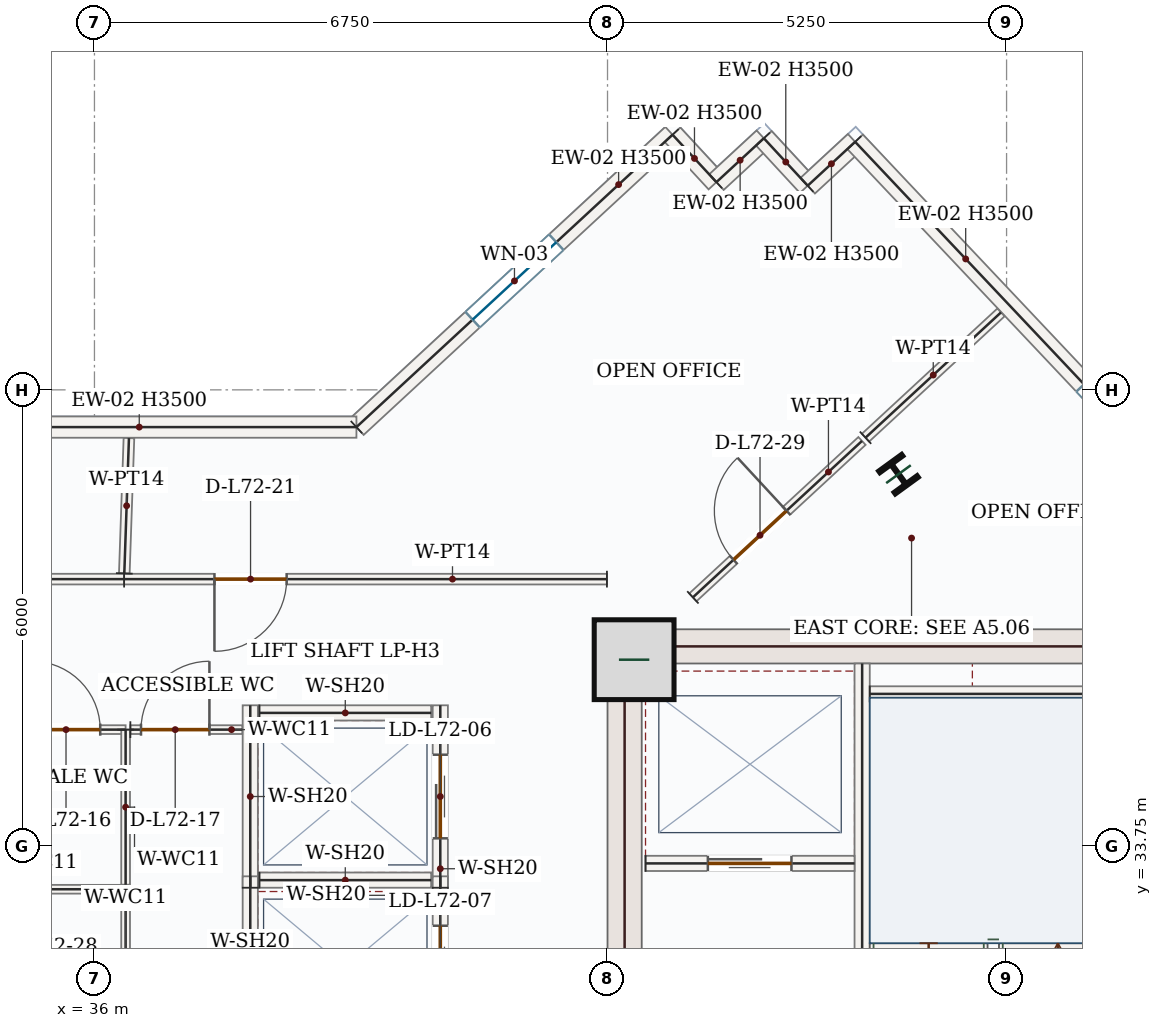
"""IFC4 building model, lengths in metres.
Left out: names, types, materials, properties, quantities, classifications, styles, units other than length and angle.
Written with IfcOpenShell. Run it as: python <this file> out.ifc"""

import sys

from ifc_helpers import new_model, si_unit, direction, frame, frame_2d, origin, origin_2d, place, context, subcontext, project, spatial, rectangle, i_section, extrude, source, transform, mapped, element, fill, save


model = new_model("IFC4")
c1 = context("Model", 3, precision=1e-05, world=origin(), true_north=direction((0.0, 1.0)))
c2 = subcontext(c1, "Body", "Model", "MODEL_VIEW")
j1 = project(units=[si_unit("LENGTHUNIT", "METRE"), si_unit("PLANEANGLEUNIT", "RADIAN")], contexts=[c1])
p1 = place(None, origin())
s1 = spatial("IfcSite", under=j1, at=p1, CompositionType="ELEMENT")
p2 = place(p1, origin())
s2 = spatial("IfcBuilding", under=s1, at=p2, CompositionType="ELEMENT")
p3 = place(p2, frame((0.0, 0.0, 299.1)))
s3 = spatial("IfcBuildingStorey", under=s2, at=p3, CompositionType="ELEMENT", Elevation=299.1)
p4 = place(p3, frame((42.975, 28.05, 0.0), z_axis=(0.0, 0.0, 1.0), x_axis=(0.0, 1.0, 0.0)))
e1 = element("IfcWall", 1, at=p4, inside=s3, PredefinedType="SHEAR", context=c2, shape_type="SweptSolid", body=[
    extrude(rectangle(XDim=8.55, YDim=0.45, at=frame_2d((4.275, 0.0))), origin(), (0.0, 0.0, 1.0), 3.5),
])
p5 = place(p4, frame((1.5, 0.0, 0.0)))
e2 = element("IfcOpeningElement", 2, at=p5, cuts=e1, PredefinedType="OPENING", context=c2, shape_type="SweptSolid", body=[
    extrude(rectangle(XDim=1.1, YDim=2.2, at=frame_2d((0.55, 1.1))), frame((0.0, 0.235, 0.0), z_axis=(0.0, -1.0, 0.0), x_axis=(1.0, 0.0, 0.0)), (0.0, 0.0, 1.0), 0.47),
])
m1 = source(origin(), c2, "Body", "SweptSolid", [
    extrude(rectangle(XDim=7.1, YDim=0.45, at=frame_2d((3.55, 0.0))), origin(), (0.0, 0.0, 1.0), 3.5),
])
p6 = place(p3, frame((43.2, 36.375, 0.0), z_axis=(0.0, 0.0, 1.0), x_axis=(1.0, 0.0, 0.0)))
e3 = element("IfcWall", 3, at=p6, inside=s3, PredefinedType="SHEAR", context=c2, shape_type="MappedRepresentation", body=[
    mapped(m1, transform((0.0, 0.0, 0.0), x_axis=(1.0, 0.0, 0.0), y_axis=(0.0, 1.0, 0.0), z_axis=(0.0, 0.0, 1.0), scale=1.0)),
])
m2 = source(origin(), c2, "Body", "SweptSolid", [
    extrude(rectangle(XDim=1.05, YDim=1.05, at=origin_2d()), origin(), (0.0, 0.0, 1.0), 3.75),
])
p7 = place(p3, frame((43.1, 36.2, 0.0), z_axis=(0.0, 0.0, 1.0), x_axis=(1.0, 0.0, 0.0)))
e4 = element("IfcColumn", 4, at=p7, inside=s3, PredefinedType="COLUMN", context=c2, shape_type="MappedRepresentation", body=[
    mapped(m2, transform((0.0, 0.0, 0.0), x_axis=(1.0, 0.0, 0.0), y_axis=(0.0, 1.0, 0.0), z_axis=(0.0, 0.0, 1.0), scale=1.0)),
])
m3 = source(origin(), c2, "Body", "SweptSolid", [
    extrude(i_section(OverallWidth=0.374, OverallDepth=0.372, WebThickness=0.016, FlangeThickness=0.026, FilletRadius=0.018, at=origin_2d()), origin(), (0.0, 0.0, 1.0), 3.75),
])
p8 = place(p3, frame((46.578, 38.641, 0.0), z_axis=(0.0, 0.0, 1.0), x_axis=(0.809016994375, 0.587785252292, 0.0)))
e5 = element("IfcColumn", 5, at=p8, inside=s3, PredefinedType="COLUMN", context=c2, shape_type="MappedRepresentation", body=[
    mapped(m3, transform((0.0, 0.0, 0.0), x_axis=(1.0, 0.0, 0.0), y_axis=(0.0, 1.0, 0.0), z_axis=(0.0, 0.0, 1.0), scale=1.0)),
])
p9 = place(p3, frame((39.447, 39.26, 0.0), z_axis=(0.0, 0.0, 1.0), x_axis=(0.734109106874, 0.679031530346, 0.0)))
e6 = element("IfcWall", 6, at=p9, inside=s3, PredefinedType="SOLIDWALL", context=c2, shape_type="SweptSolid", body=[
    extrude(rectangle(XDim=5.665, YDim=0.28, at=frame_2d((2.833, 0.0))), origin(), (0.0, 0.0, 1.0), 3.5),
])
p10 = place(p9, frame((2.082, 0.0, 0.85)))
e7 = element("IfcOpeningElement", 7, at=p10, cuts=e6, PredefinedType="OPENING", context=c2, shape_type="SweptSolid", body=[
    extrude(rectangle(XDim=1.5, YDim=1.5, at=frame_2d((0.75, 0.75))), frame((0.0, 0.15, 0.0), z_axis=(0.0, -1.0, 0.0), x_axis=(1.0, 0.0, 0.0)), (0.0, 0.0, 1.0), 0.3),
])
m4 = source(origin(), c2, "Body", "SweptSolid", [
    extrude(rectangle(XDim=0.85, YDim=0.28, at=frame_2d((0.425, 0.0))), origin(), (0.0, 0.0, 1.0), 3.5),
])
for number, where, z_axis, x_axis in (
    (8, (43.605, 43.107, 0.0), (0.0, 0.0, 1.0), (0.679, -0.734, 0.0)),
    (9, (44.183, 42.483, 0.0), (0.0, 0.0, 1.0), (0.734, 0.679, 0.0)),
    (10, (44.807, 43.06, 0.0), (0.0, 0.0, 1.0), (0.679, -0.734, 0.0)),
    (11, (45.384, 42.436, 0.0), (0.0, 0.0, 1.0), (0.734, 0.679, 0.0)),
):
    element("IfcWall", number, at=place(p3, frame(where, z_axis=z_axis, x_axis=x_axis)), inside=s3, PredefinedType="SOLIDWALL", context=c2, shape_type="MappedRepresentation", body=[
        mapped(m4, transform((0.0, 0.0, 0.0), x_axis=(1.0, 0.0, 0.0), y_axis=(0.0, 1.0, 0.0), z_axis=(0.0, 0.0, 1.0), scale=1.0)),
    ])
p11 = place(p3, frame((46.008, 43.013, 0.0), z_axis=(0.0, 0.0, 1.0), x_axis=(0.68643580465, -0.727190405667, 0.0)))
e12 = element("IfcWall", 12, at=p11, inside=s3, PredefinedType="SOLIDWALL", context=c2, shape_type="SweptSolid", body=[
    extrude(rectangle(XDim=10.274, YDim=0.28, at=frame_2d((5.137, 0.0))), origin(), (0.0, 0.0, 1.0), 3.5),
])
p12 = place(p11, frame((4.387, 0.0, 0.85)))
e13 = element("IfcOpeningElement", 13, at=p12, cuts=e12, PredefinedType="OPENING", context=c2, shape_type="SweptSolid", body=[
    extrude(rectangle(XDim=1.5, YDim=1.5, at=frame_2d((0.75, 0.75))), frame((0.0, 0.15, 0.0), z_axis=(0.0, -1.0, 0.0), x_axis=(1.0, 0.0, 0.0)), (0.0, 0.0, 1.0), 0.3),
])
m5 = source(origin(), c2, "Body", "SweptSolid", [
    extrude(rectangle(XDim=5.714, YDim=0.28, at=frame_2d((2.857, 0.0))), origin(), (0.0, 0.0, 1.0), 3.5),
])
p13 = place(p3, frame((33.732, 39.26, 0.0), z_axis=(0.0, 0.0, 1.0), x_axis=(1.0, 0.0, 0.0)))
e14 = element("IfcWall", 14, at=p13, inside=s3, PredefinedType="SOLIDWALL", context=c2, shape_type="MappedRepresentation", body=[
    mapped(m5, transform((0.0, 0.0, 0.0), x_axis=(1.0, 0.0, 0.0), y_axis=(0.0, 1.0, 0.0), z_axis=(0.0, 0.0, 1.0), scale=1.0)),
])
p14 = place(p3, frame((46.1, 28.15, 0.0), z_axis=(0.0, 0.0, 1.0), x_axis=(0.0, 1.0, 0.0)))
e15 = element("IfcWall", 15, at=p14, inside=s3, PredefinedType="SOLIDWALL", context=c2, shape_type="SweptSolid", body=[
    extrude(rectangle(XDim=8.0, YDim=0.2, at=frame_2d((4.0, 0.0))), origin(), (0.0, 0.0, 1.0), 3.5),
])
p15 = place(p14, frame((0.4, 0.0, 0.0)))
e16 = element("IfcOpeningElement", 16, at=p15, cuts=e15, PredefinedType="OPENING", context=c2, shape_type="SweptSolid", body=[
    extrude(rectangle(XDim=1.05, YDim=2.15, at=frame_2d((0.525, 1.075))), frame((0.0, 0.11, 0.0), z_axis=(0.0, -1.0, 0.0), x_axis=(1.0, 0.0, 0.0)), (0.0, 0.0, 1.0), 0.22),
])
m6 = source(origin(), c2, "Body", "SweptSolid", [
    extrude(rectangle(XDim=3.25, YDim=0.2, at=frame_2d((1.625, 0.0))), origin(), (0.0, 0.0, 1.0), 3.5),
])
p16 = place(p3, frame((46.2, 35.75, 0.0), z_axis=(0.0, 0.0, 1.0), x_axis=(1.0, 0.0, 0.0)))
e17 = element("IfcWall", 17, at=p16, inside=s3, PredefinedType="SOLIDWALL", context=c2, shape_type="MappedRepresentation", body=[
    mapped(m6, transform((0.0, 0.0, 0.0), x_axis=(1.0, 0.0, 0.0), y_axis=(0.0, 1.0, 0.0), z_axis=(0.0, 0.0, 1.0), scale=1.0)),
])
p17 = place(p3, frame((43.25, 33.52, 0.0), z_axis=(0.0, 0.0, 1.0), x_axis=(1.0, 0.0, 0.0)))
e18 = element("IfcWall", 18, at=p17, inside=s3, PredefinedType="SOLIDWALL", context=c2, shape_type="SweptSolid", body=[
    extrude(rectangle(XDim=2.75, YDim=0.2, at=frame_2d((1.375, 0.0))), origin(), (0.0, 0.0, 1.0), 3.5),
])
p18 = place(p17, frame((0.82, 0.0, 0.0)))
e19 = element("IfcOpeningElement", 19, at=p18, cuts=e18, PredefinedType="OPENING", context=c2, shape_type="SweptSolid", body=[
    extrude(rectangle(XDim=1.1, YDim=2.15, at=frame_2d((0.55, 1.075))), frame((0.0, 0.11, 0.0), z_axis=(0.0, -1.0, 0.0), x_axis=(1.0, 0.0, 0.0)), (0.0, 0.0, 1.0), 0.22),
])
m7 = source(origin(), c2, "Body", "SweptSolid", [
    extrude(rectangle(XDim=2.4, YDim=0.2, at=frame_2d((1.2, 0.0))), origin(), (0.0, 0.0, 1.0), 3.5),
])
p19 = place(p3, frame((38.05, 33.2, 0.0), z_axis=(0.0, 0.0, 1.0), x_axis=(0.0, 1.0, 0.0)))
e20 = element("IfcWall", 20, at=p19, inside=s3, PredefinedType="SOLIDWALL", context=c2, shape_type="MappedRepresentation", body=[
    mapped(m7, transform((0.0, 0.0, 0.0), x_axis=(1.0, 0.0, 0.0), y_axis=(0.0, 1.0, 0.0), z_axis=(0.0, 0.0, 1.0), scale=1.0)),
])
p20 = place(p3, frame((40.55, 33.2, 0.0), z_axis=(0.0, 0.0, 1.0), x_axis=(0.0, 1.0, 0.0)))
e21 = element("IfcWall", 21, at=p20, inside=s3, PredefinedType="SOLIDWALL", context=c2, shape_type="SweptSolid", body=[
    extrude(rectangle(XDim=2.4, YDim=0.2, at=frame_2d((1.2, 0.0))), origin(), (0.0, 0.0, 1.0), 3.5),
])
p21 = place(p20, frame((0.65, 0.0, 0.0)))
e22 = element("IfcOpeningElement", 22, at=p21, cuts=e21, PredefinedType="OPENING", context=c2, shape_type="SweptSolid", body=[
    extrude(rectangle(XDim=1.1, YDim=2.15, at=frame_2d((0.55, 1.075))), frame((0.0, 0.11, 0.0), z_axis=(0.0, -1.0, 0.0), x_axis=(1.0, 0.0, 0.0)), (0.0, 0.0, 1.0), 0.22),
])
m8 = source(origin(), c2, "Body", "SweptSolid", [
    extrude(rectangle(XDim=2.26, YDim=0.2, at=frame_2d((1.13, 0.0))), origin(), (0.0, 0.0, 1.0), 3.5),
])
for number, where, z_axis, x_axis in (
    (23, (38.17, 33.3, 0.0), (0.0, 0.0, 1.0), (1.0, 0.0, 0.0)),
    (24, (38.17, 35.5, 0.0), (0.0, 0.0, 1.0), (1.0, 0.0, 0.0)),
):
    element("IfcWall", number, at=place(p3, frame(where, z_axis=z_axis, x_axis=x_axis)), inside=s3, PredefinedType="SOLIDWALL", context=c2, shape_type="MappedRepresentation", body=[
        mapped(m8, transform((0.0, 0.0, 0.0), x_axis=(1.0, 0.0, 0.0), y_axis=(0.0, 1.0, 0.0), z_axis=(0.0, 0.0, 1.0), scale=1.0)),
    ])
p22 = place(p3, frame((38.05, 30.95, 0.0), z_axis=(0.0, 0.0, 1.0), x_axis=(0.0, 1.0, 0.0)))
e25 = element("IfcWall", 25, at=p22, inside=s3, PredefinedType="SOLIDWALL", context=c2, shape_type="MappedRepresentation", body=[
    mapped(m7, transform((0.0, 0.0, 0.0), x_axis=(1.0, 0.0, 0.0), y_axis=(0.0, 1.0, 0.0), z_axis=(0.0, 0.0, 1.0), scale=1.0)),
])
p23 = place(p3, frame((40.55, 30.95, 0.0), z_axis=(0.0, 0.0, 1.0), x_axis=(0.0, 1.0, 0.0)))
e26 = element("IfcWall", 26, at=p23, inside=s3, PredefinedType="SOLIDWALL", context=c2, shape_type="SweptSolid", body=[
    extrude(rectangle(XDim=2.4, YDim=0.2, at=frame_2d((1.2, 0.0))), origin(), (0.0, 0.0, 1.0), 3.5),
])
p24 = place(p23, frame((0.65, 0.0, 0.0)))
e27 = element("IfcOpeningElement", 27, at=p24, cuts=e26, PredefinedType="OPENING", context=c2, shape_type="SweptSolid", body=[
    extrude(rectangle(XDim=1.1, YDim=2.15, at=frame_2d((0.55, 1.075))), frame((0.0, 0.11, 0.0), z_axis=(0.0, -1.0, 0.0), x_axis=(1.0, 0.0, 0.0)), (0.0, 0.0, 1.0), 0.22),
])
m9 = source(origin(), c2, "Body", "SweptSolid", [
    extrude(rectangle(XDim=2.355, YDim=0.115, at=frame_2d((1.177, 0.0))), origin(), (0.0, 0.0, 1.0), 3.5),
])
p25 = place(p3, frame((34.055, 33.18, 0.0), z_axis=(0.0, 0.0, 1.0), x_axis=(1.0, 0.0, 0.0)))
e28 = element("IfcWall", 28, at=p25, inside=s3, PredefinedType="PARTITIONING", context=c2, shape_type="MappedRepresentation", body=[
    mapped(m9, transform((0.0, 0.0, 0.0), x_axis=(1.0, 0.0, 0.0), y_axis=(0.0, 1.0, 0.0), z_axis=(0.0, 0.0, 1.0), scale=1.0)),
])
m10 = source(origin(), c2, "Body", "SweptSolid", [
    extrude(rectangle(XDim=1.96, YDim=0.115, at=frame_2d((0.98, 0.0))), origin(), (0.0, 0.0, 1.0), 3.5),
])
p26 = place(p3, frame((36.41, 33.18, 0.0), z_axis=(0.0, 0.0, 1.0), x_axis=(0.0, -1.0, 0.0)))
e29 = element("IfcWall", 29, at=p26, inside=s3, PredefinedType="PARTITIONING", context=c2, shape_type="MappedRepresentation", body=[
    mapped(m10, transform((0.0, 0.0, 0.0), x_axis=(1.0, 0.0, 0.0), y_axis=(0.0, 1.0, 0.0), z_axis=(0.0, 0.0, 1.0), scale=1.0)),
])
p27 = place(p3, frame((34.055, 35.28, 0.0), z_axis=(0.0, 0.0, 1.0), x_axis=(1.0, 0.0, 0.0)))
e30 = element("IfcWall", 30, at=p27, inside=s3, PredefinedType="PARTITIONING", context=c2, shape_type="SweptSolid", body=[
    extrude(rectangle(XDim=2.355, YDim=0.115, at=frame_2d((1.177, 0.0))), origin(), (0.0, 0.0, 1.0), 3.5),
])
p28 = place(p27, frame((1.121, 0.0, 0.0)))
e31 = element("IfcOpeningElement", 31, at=p28, cuts=e30, PredefinedType="OPENING", context=c2, shape_type="SweptSolid", body=[
    extrude(rectangle(XDim=0.9, YDim=2.1, at=frame_2d((0.45, 1.05))), frame((0.0, 0.067, 0.0), z_axis=(0.0, -1.0, 0.0), x_axis=(1.0, 0.0, 0.0)), (0.0, 0.0, 1.0), 0.135),
])
m11 = source(origin(), c2, "Body", "SweptSolid", [
    extrude(rectangle(XDim=2.04, YDim=0.115, at=frame_2d((1.02, 0.0))), origin(), (0.0, 0.0, 1.0), 3.5),
])
p29 = place(p3, frame((36.41, 35.28, 0.0), z_axis=(0.0, 0.0, 1.0), x_axis=(0.0, -1.0, 0.0)))
e32 = element("IfcWall", 32, at=p29, inside=s3, PredefinedType="PARTITIONING", context=c2, shape_type="MappedRepresentation", body=[
    mapped(m11, transform((0.0, 0.0, 0.0), x_axis=(1.0, 0.0, 0.0), y_axis=(0.0, 1.0, 0.0), z_axis=(0.0, 0.0, 1.0), scale=1.0)),
])
p30 = place(p3, frame((36.472, 35.28, 0.0), z_axis=(0.0, 0.0, 1.0), x_axis=(1.0, 0.0, 0.0)))
e33 = element("IfcWall", 33, at=p30, inside=s3, PredefinedType="PARTITIONING", context=c2, shape_type="SweptSolid", body=[
    extrude(rectangle(XDim=1.473, YDim=0.115, at=frame_2d((0.736, 0.0))), origin(), (0.0, 0.0, 1.0), 3.5),
])
p31 = place(p30, frame((0.14, 0.0, 0.0)))
e34 = element("IfcOpeningElement", 34, at=p31, cuts=e33, PredefinedType="OPENING", context=c2, shape_type="SweptSolid", body=[
    extrude(rectangle(XDim=0.9, YDim=2.1, at=frame_2d((0.45, 1.05))), frame((0.0, 0.067, 0.0), z_axis=(0.0, -1.0, 0.0), x_axis=(1.0, 0.0, 0.0)), (0.0, 0.0, 1.0), 0.135),
])
p32 = place(p3, frame((43.873, 37.02, 0.0), z_axis=(0.0, 0.0, 1.0), x_axis=(0.734120521476, 0.679019189676, 0.0)))
e35 = element("IfcWall", 35, at=p32, inside=s3, PredefinedType="PARTITIONING", context=c2, shape_type="SweptSolid", body=[
    extrude(rectangle(XDim=3.031, YDim=0.14, at=frame_2d((1.515, 0.0))), origin(), (0.0, 0.0, 1.0), 3.5),
])
p33 = place(p32, frame((0.728, 0.0, 0.0)))
e36 = element("IfcOpeningElement", 36, at=p33, cuts=e35, PredefinedType="OPENING", context=c2, shape_type="SweptSolid", body=[
    extrude(rectangle(XDim=0.95, YDim=2.15, at=frame_2d((0.475, 1.075))), frame((0.0, 0.08, 0.0), z_axis=(0.0, -1.0, 0.0), x_axis=(1.0, 0.0, 0.0)), (0.0, 0.0, 1.0), 0.16),
])
m12 = source(origin(), c2, "Body", "SweptSolid", [
    extrude(rectangle(XDim=2.428, YDim=0.14, at=frame_2d((1.214, 0.0))), origin(), (0.0, 0.0, 1.0), 3.5),
])
p34 = place(p3, frame((46.144, 39.121, 0.0), z_axis=(0.0, 0.0, 1.0), x_axis=(0.734124504125, 0.679014883815, 0.0)))
e37 = element("IfcWall", 37, at=p34, inside=s3, PredefinedType="PARTITIONING", context=c2, shape_type="MappedRepresentation", body=[
    mapped(m12, transform((0.0, 0.0, 0.0), x_axis=(1.0, 0.0, 0.0), y_axis=(0.0, 1.0, 0.0), z_axis=(0.0, 0.0, 1.0), scale=1.0)),
])
p35 = place(p3, frame((42.742, 37.26, 0.0), z_axis=(0.0, 0.0, 1.0), x_axis=(-0.999999999261, 3.8433452e-05, 0.0)))
e38 = element("IfcWall", 38, at=p35, inside=s3, PredefinedType="PARTITIONING", context=c2, shape_type="SweptSolid", body=[
    extrude(rectangle(XDim=6.352, YDim=0.14, at=frame_2d((3.176, 0.0))), origin(), (0.0, 0.0, 1.0), 3.5),
])
p36 = place(p35, frame((4.214, 0.0, 0.0)))
e39 = element("IfcOpeningElement", 39, at=p36, cuts=e38, PredefinedType="OPENING", context=c2, shape_type="SweptSolid", body=[
    extrude(rectangle(XDim=0.95, YDim=2.15, at=frame_2d((0.475, 1.075))), frame((0.0, 0.08, 0.0), z_axis=(0.0, -1.0, 0.0), x_axis=(1.0, 0.0, 0.0)), (0.0, 0.0, 1.0), 0.16),
])
m13 = source(origin(), c2, "Body", "SweptSolid", [
    extrude(rectangle(XDim=1.781, YDim=0.14, at=frame_2d((0.891, 0.0))), origin(), (0.0, 0.0, 1.0), 3.5),
])
p37 = place(p3, frame((36.393, 37.335, 0.0), z_axis=(0.0, 0.0, 1.0), x_axis=(0.034268709891, 0.999412655274, 0.0)))
e40 = element("IfcWall", 40, at=p37, inside=s3, PredefinedType="PARTITIONING", context=c2, shape_type="MappedRepresentation", body=[
    mapped(m13, transform((0.0, 0.0, 0.0), x_axis=(1.0, 0.0, 0.0), y_axis=(0.0, 1.0, 0.0), z_axis=(0.0, 0.0, 1.0), scale=1.0)),
])
p38 = place(p3, frame((36.39, 37.26, 0.0), z_axis=(0.0, 0.0, 1.0), x_axis=(-0.999999997659, -6.8420512e-05, 0.0)))
e41 = element("IfcWall", 41, at=p38, inside=s3, PredefinedType="PARTITIONING", context=c2, shape_type="SweptSolid", body=[
    extrude(rectangle(XDim=7.136, YDim=0.14, at=frame_2d((3.568, 0.0))), origin(), (0.0, 0.0, 1.0), 3.5),
])
p39 = place(p38, frame((1.361, 0.0, 0.0)))
e42 = element("IfcOpeningElement", 42, at=p39, cuts=e41, PredefinedType="OPENING", context=c2, shape_type="SweptSolid", body=[
    extrude(rectangle(XDim=0.95, YDim=2.15, at=frame_2d((0.475, 1.075))), frame((0.0, 0.08, 0.0), z_axis=(0.0, -1.0, 0.0), x_axis=(1.0, 0.0, 0.0)), (0.0, 0.0, 1.0), 0.16),
])
m14 = source(origin(), c2, "Body", "SweptSolid", [
    extrude(rectangle(XDim=1.5, YDim=1.5, at=frame_2d((0.75, 0.75))), frame((0.0, 0.03, 0.0), z_axis=(0.0, -1.0, 0.0), x_axis=(1.0, 0.0, 0.0)), (0.0, 0.0, 1.0), 0.06),
])
p40 = place(p10, origin())
e43 = element("IfcWindow", 43, at=p40, inside=s3, PartitioningType="SINGLE_PANEL", PredefinedType="WINDOW", context=c2, shape_type="MappedRepresentation", body=[
    mapped(m14, transform((0.0, 0.0, 0.0), x_axis=(1.0, 0.0, 0.0), y_axis=(0.0, 1.0, 0.0), z_axis=(0.0, 0.0, 1.0), scale=1.0)),
])
fill(e7, e43)
p41 = place(p12, origin())
e44 = element("IfcWindow", 44, at=p41, inside=s3, PartitioningType="SINGLE_PANEL", PredefinedType="WINDOW", context=c2, shape_type="MappedRepresentation", body=[
    mapped(m14, transform((0.0, 0.0, 0.0), x_axis=(1.0, 0.0, 0.0), y_axis=(0.0, 1.0, 0.0), z_axis=(0.0, 0.0, 1.0), scale=1.0)),
])
fill(e13, e44)
m15 = source(origin(), c2, "Body", "SweptSolid", [
    extrude(rectangle(XDim=1.1, YDim=2.15, at=frame_2d((0.55, 1.075))), frame((0.0, 0.025, 0.0), z_axis=(0.0, -1.0, 0.0), x_axis=(1.0, 0.0, 0.0)), (0.0, 0.0, 1.0), 0.05),
])
p42 = place(p18, origin())
e45 = element("IfcDoor", 45, at=p42, inside=s3, OperationType="DOUBLE_DOOR_SLIDING", PredefinedType="DOOR", context=c2, shape_type="MappedRepresentation", body=[
    mapped(m15, transform((0.0, 0.0, 0.0), x_axis=(1.0, 0.0, 0.0), y_axis=(0.0, 1.0, 0.0), z_axis=(0.0, 0.0, 1.0), scale=1.0)),
])
fill(e19, e45)
p43 = place(p21, origin())
e46 = element("IfcDoor", 46, at=p43, inside=s3, OperationType="DOUBLE_DOOR_SLIDING", PredefinedType="DOOR", context=c2, shape_type="MappedRepresentation", body=[
    mapped(m15, transform((0.0, 0.0, 0.0), x_axis=(1.0, 0.0, 0.0), y_axis=(0.0, 1.0, 0.0), z_axis=(0.0, 0.0, 1.0), scale=1.0)),
])
fill(e22, e46)
p44 = place(p24, origin())
e47 = element("IfcDoor", 47, at=p44, inside=s3, OperationType="DOUBLE_DOOR_SLIDING", PredefinedType="DOOR", context=c2, shape_type="MappedRepresentation", body=[
    mapped(m15, transform((0.0, 0.0, 0.0), x_axis=(1.0, 0.0, 0.0), y_axis=(0.0, 1.0, 0.0), z_axis=(0.0, 0.0, 1.0), scale=1.0)),
])
fill(e27, e47)
m16 = source(origin(), c2, "Body", "SweptSolid", [
    extrude(rectangle(XDim=0.9, YDim=2.1, at=frame_2d((0.45, 1.05))), frame((0.0, 0.025, 0.0), z_axis=(0.0, -1.0, 0.0), x_axis=(1.0, 0.0, 0.0)), (0.0, 0.0, 1.0), 0.05),
])
p45 = place(p28, origin())
e48 = element("IfcDoor", 48, at=p45, inside=s3, OperationType="SINGLE_SWING_LEFT", PredefinedType="DOOR", context=c2, shape_type="MappedRepresentation", body=[
    mapped(m16, transform((0.0, 0.0, 0.0), x_axis=(1.0, 0.0, 0.0), y_axis=(0.0, 1.0, 0.0), z_axis=(0.0, 0.0, 1.0), scale=1.0)),
])
fill(e31, e48)
p46 = place(p31, origin())
e49 = element("IfcDoor", 49, at=p46, inside=s3, OperationType="SINGLE_SWING_RIGHT", PredefinedType="DOOR", context=c2, shape_type="MappedRepresentation", body=[
    mapped(m16, transform((0.0, 0.0, 0.0), x_axis=(1.0, 0.0, 0.0), y_axis=(0.0, 1.0, 0.0), z_axis=(0.0, 0.0, 1.0), scale=1.0)),
])
fill(e34, e49)
m17 = source(origin(), c2, "Body", "SweptSolid", [
    extrude(rectangle(XDim=0.95, YDim=2.15, at=frame_2d((0.475, 1.075))), frame((0.0, 0.025, 0.0), z_axis=(0.0, -1.0, 0.0), x_axis=(1.0, 0.0, 0.0)), (0.0, 0.0, 1.0), 0.05),
])
p47 = place(p36, origin())
e50 = element("IfcDoor", 50, at=p47, inside=s3, OperationType="SINGLE_SWING_RIGHT", PredefinedType="DOOR", context=c2, shape_type="MappedRepresentation", body=[
    mapped(m17, transform((0.0, 0.0, 0.0), x_axis=(1.0, 0.0, 0.0), y_axis=(0.0, 1.0, 0.0), z_axis=(0.0, 0.0, 1.0), scale=1.0)),
])
fill(e39, e50)
p48 = place(p33, origin())
e51 = element("IfcDoor", 51, at=p48, inside=s3, OperationType="SINGLE_SWING_RIGHT", PredefinedType="DOOR", context=c2, shape_type="MappedRepresentation", body=[
    mapped(m17, transform((0.0, 0.0, 0.0), x_axis=(1.0, 0.0, 0.0), y_axis=(0.0, 1.0, 0.0), z_axis=(0.0, 0.0, 1.0), scale=1.0)),
])
fill(e36, e51)
save(model, sys.argv[1])
